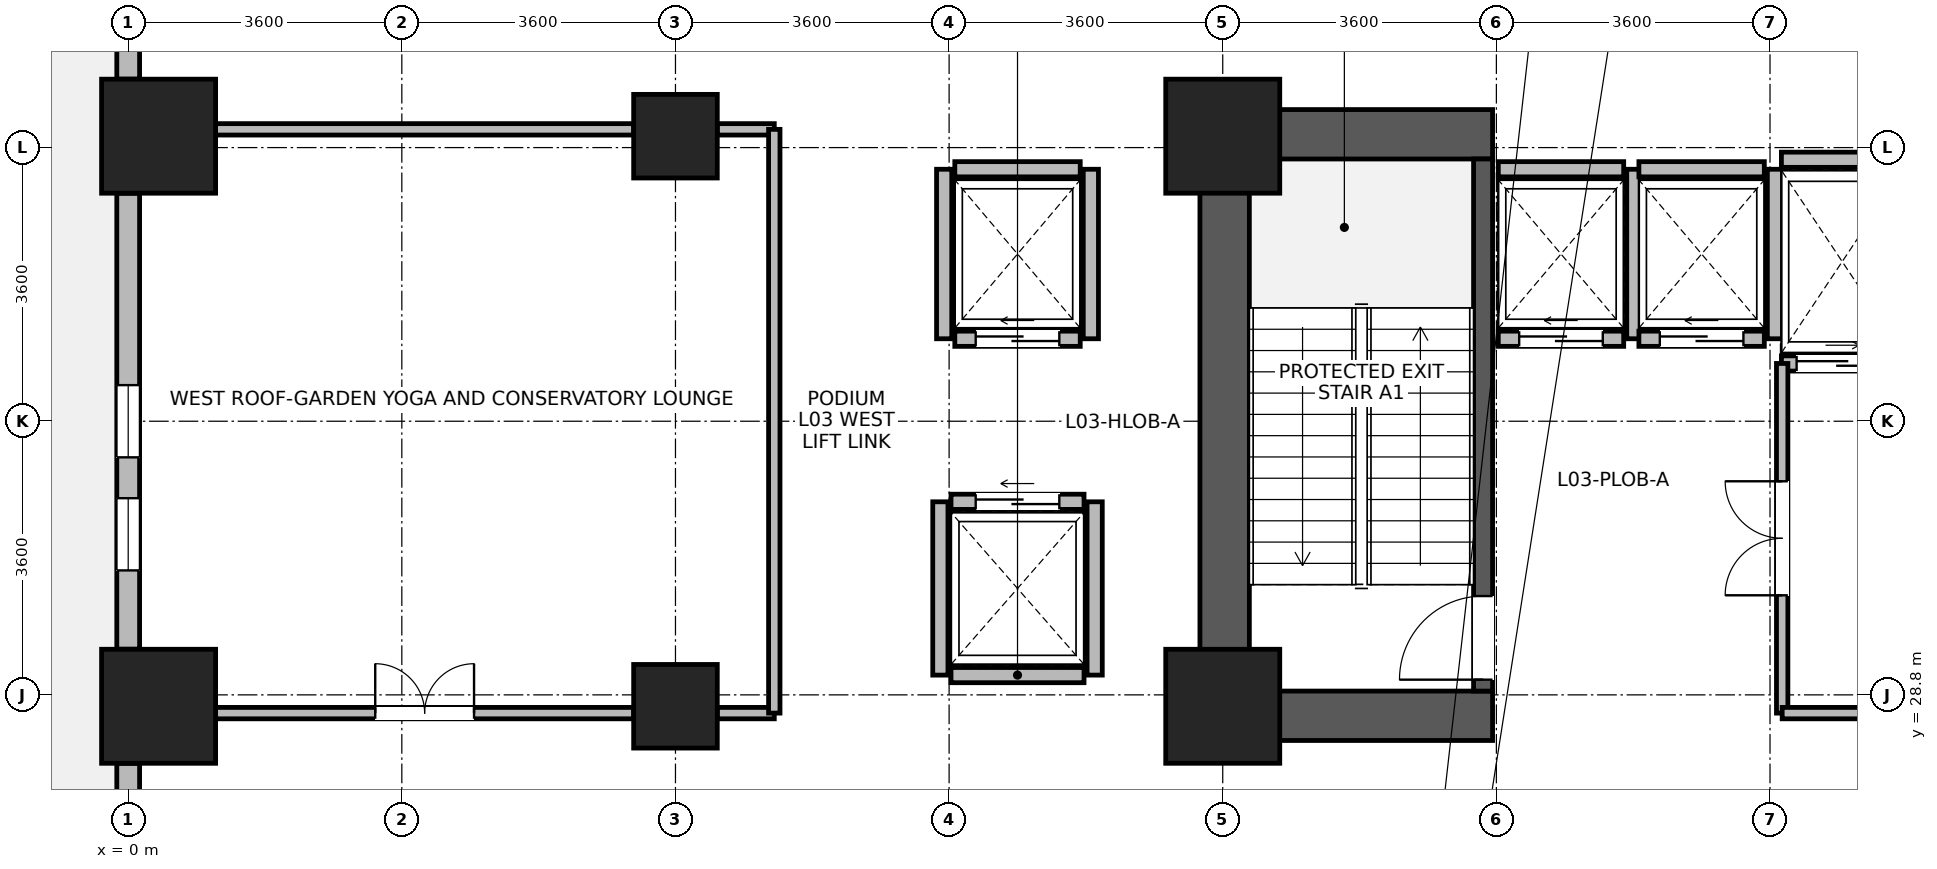
"""IFC4 building model, lengths in metres.
Left out: names, types, materials, properties, quantities, classifications, styles, units other than length and angle.
Written with IfcOpenShell. Run it as: python <this file> out.ifc"""

import sys

from ifc_helpers import new_model, si_unit, direction, frame, frame_2d, origin, origin_2d, place, context, subcontext, project, spatial, rectangle, circle, extrude, source, transform, mapped, element, fill, save


model = new_model("IFC4")
c1 = context("Model", 3, precision=1e-05, world=origin(), true_north=direction((0.0, 1.0)))
c2 = subcontext(c1, "Body", "Model", "MODEL_VIEW")
j1 = project(units=[si_unit("LENGTHUNIT", "METRE"), si_unit("PLANEANGLEUNIT", "RADIAN")], contexts=[c1])
p1 = place(None, origin())
s1 = spatial("IfcSite", under=j1, at=p1, CompositionType="ELEMENT")
p2 = place(p1, origin())
s2 = spatial("IfcBuilding", under=s1, at=p2, CompositionType="ELEMENT")
p3 = place(p2, frame((0.0, 0.0, 15.0)))
s3 = spatial("IfcBuildingStorey", under=s2, at=p3, CompositionType="ELEMENT", Elevation=15.0)
p4 = place(p3, frame((14.425, 28.2, 0.0), z_axis=(0.0, 0.0, 1.0), x_axis=(0.0, 1.0, 0.0)))
e1 = element("IfcWall", 1, at=p4, inside=s3, PredefinedType="SHEAR", context=c2, shape_type="SweptSolid", body=[
    extrude(rectangle(XDim=8.3, YDim=0.65, at=frame_2d((4.15, 0.0))), origin(), (0.0, 0.0, 1.0), 4.38),
])
for number, where, z_axis, x_axis in (
    (2, (14.75, 28.525, 0.0), (0.0, 0.0, 1.0), (1.0, 0.0, 0.0)),
    (3, (14.75, 36.175, 0.0), (0.0, 0.0, 1.0), (1.0, 0.0, 0.0)),
):
    element("IfcWall", number, at=place(p3, frame(where, z_axis=z_axis, x_axis=x_axis)), inside=s3, PredefinedType="SHEAR", context=c2, shape_type="SweptSolid", body=[
        extrude(rectangle(XDim=3.2, YDim=0.65, at=frame_2d((1.6, 0.0))), origin(), (0.0, 0.0, 1.0), 4.38),
    ])
p5 = place(p3, frame((17.825, 28.85, 0.0), z_axis=(0.0, 0.0, 1.0), x_axis=(0.0, 1.0, 0.0)))
e4 = element("IfcWall", 4, at=p5, inside=s3, PredefinedType="SHEAR", context=c2, shape_type="SweptSolid", body=[
    extrude(rectangle(XDim=7.0, YDim=0.25, at=frame_2d((3.5, 0.0))), origin(), (0.0, 0.0, 1.0), 4.38),
])
p6 = place(p5, frame((0.15, 0.0, 0.0)))
e5 = element("IfcOpeningElement", 5, at=p6, cuts=e4, PredefinedType="OPENING", context=c2, shape_type="SweptSolid", body=[
    extrude(rectangle(XDim=1.1, YDim=2.08, at=frame_2d((0.55, 1.04))), frame((0.0, 0.135, 0.0), z_axis=(0.0, -1.0, 0.0), x_axis=(1.0, 0.0, 0.0)), (0.0, 0.0, 1.0), 0.27),
])
m1 = source(origin(), c2, "Body", "SweptSolid", [
    extrude(circle(Radius=0.55, at=origin_2d()), origin(), (0.0, 0.0, 1.0), 4.8),
])
for number, where, z_axis, x_axis in (
    (6, (7.2, 28.65, 0.0), (0.0, 0.0, 1.0), (1.0, 0.0, 0.0)),
    (7, (7.2, 36.15, 0.0), (0.0, 0.0, 1.0), (1.0, 0.0, 0.0)),
):
    element("IfcColumn", number, at=place(p3, frame(where, z_axis=z_axis, x_axis=x_axis)), inside=s3, PredefinedType="COLUMN", context=c2, shape_type="MappedRepresentation", body=[
        mapped(m1, transform((0.0, 0.0, 0.0), x_axis=(1.0, 0.0, 0.0), y_axis=(0.0, 1.0, 0.0), z_axis=(0.0, 0.0, 1.0), scale=1.0)),
    ])
m2 = source(origin(), c2, "Body", "SweptSolid", [
    extrude(rectangle(XDim=1.5, YDim=1.5, at=origin_2d()), origin(), (0.0, 0.0, 1.0), 4.8),
])
for number, where, z_axis, x_axis in (
    (8, (14.4, 28.65, 0.0), (0.0, 0.0, 1.0), (1.0, 0.0, 0.0)),
    (9, (14.4, 36.15, 0.0), (0.0, 0.0, 1.0), (1.0, 0.0, 0.0)),
    (10, (0.4, 28.65, 0.0), (0.0, 0.0, 1.0), (1.0, 0.0, 0.0)),
    (11, (0.4, 36.15, 0.0), (0.0, 0.0, 1.0), (1.0, 0.0, 0.0)),
):
    element("IfcColumn", number, at=place(p3, frame(where, z_axis=z_axis, x_axis=x_axis)), inside=s3, PredefinedType="COLUMN", context=c2, shape_type="MappedRepresentation", body=[
        mapped(m2, transform((0.0, 0.0, 0.0), x_axis=(1.0, 0.0, 0.0), y_axis=(0.0, 1.0, 0.0), z_axis=(0.0, 0.0, 1.0), scale=1.0)),
    ])
p7 = place(p3, frame((0.0, 36.901, 0.0), z_axis=(0.0, 0.0, 1.0), x_axis=(0.0, 1.0, 0.0)))
e12 = element("IfcWall", 12, at=p7, inside=s3, PredefinedType="STANDARD", context=c2, shape_type="SweptSolid", body=[
    extrude(rectangle(XDim=7.198, YDim=0.3, at=frame_2d((3.599, 0.0))), origin(), (0.0, 0.0, 1.0), 4.36),
])
p8 = place(p7, frame((2.699, 0.0, 0.0)))
e13 = element("IfcOpeningElement", 13, at=p8, cuts=e12, PredefinedType="OPENING", context=c2, shape_type="SweptSolid", body=[
    extrude(rectangle(XDim=1.8, YDim=2.2, at=frame_2d((0.9, 1.1))), frame((0.0, 0.16, 0.0), z_axis=(0.0, -1.0, 0.0), x_axis=(1.0, 0.0, 0.0)), (0.0, 0.0, 1.0), 0.32),
])
p9 = place(p3, frame((0.0, 29.401, 0.0), z_axis=(0.0, 0.0, 1.0), x_axis=(0.0, 1.0, 0.0)))
e14 = element("IfcWall", 14, at=p9, inside=s3, PredefinedType="STANDARD", context=c2, shape_type="SweptSolid", body=[
    extrude(rectangle(XDim=5.998, YDim=0.3, at=frame_2d((2.999, 0.0))), origin(), (0.0, 0.0, 1.0), 4.36),
])
p10 = place(p9, frame((2.524, 0.0, 0.9)))
e15 = element("IfcOpeningElement", 15, at=p10, cuts=e14, PredefinedType="OPENING", context=c2, shape_type="SweptSolid", body=[
    extrude(rectangle(XDim=0.95, YDim=1.75, at=frame_2d((0.475, 0.875))), frame((0.0, 0.16, 0.0), z_axis=(0.0, -1.0, 0.0), x_axis=(1.0, 0.0, 0.0)), (0.0, 0.0, 1.0), 0.32),
])
p11 = place(p9, frame((1.037, 0.0, 0.9)))
e16 = element("IfcOpeningElement", 16, at=p11, cuts=e14, PredefinedType="OPENING", context=c2, shape_type="SweptSolid", body=[
    extrude(rectangle(XDim=0.95, YDim=1.75, at=frame_2d((0.475, 0.875))), frame((0.0, 0.16, 0.0), z_axis=(0.0, -1.0, 0.0), x_axis=(1.0, 0.0, 0.0)), (0.0, 0.0, 1.0), 0.32),
])
p12 = place(p3, frame((0.0, 18.751, 0.0), z_axis=(0.0, 0.0, 1.0), x_axis=(0.0, 1.0, 0.0)))
e17 = element("IfcWall", 17, at=p12, inside=s3, PredefinedType="STANDARD", context=c2, shape_type="SweptSolid", body=[
    extrude(rectangle(XDim=9.148, YDim=0.3, at=frame_2d((4.574, 0.0))), origin(), (0.0, 0.0, 1.0), 4.36),
])
p13 = place(p12, frame((0.325, 0.0, 0.9)))
e18 = element("IfcOpeningElement", 18, at=p13, cuts=e17, PredefinedType="OPENING", context=c2, shape_type="SweptSolid", body=[
    extrude(rectangle(XDim=2.4, YDim=2.5, at=frame_2d((1.2, 1.25))), frame((0.0, 0.16, 0.0), z_axis=(0.0, -1.0, 0.0), x_axis=(1.0, 0.0, 0.0)), (0.0, 0.0, 1.0), 0.32),
])
p14 = place(p12, frame((3.374, 0.0, 0.9)))
e19 = element("IfcOpeningElement", 19, at=p14, cuts=e17, PredefinedType="OPENING", context=c2, shape_type="SweptSolid", body=[
    extrude(rectangle(XDim=2.4, YDim=2.5, at=frame_2d((1.2, 1.25))), frame((0.0, 0.16, 0.0), z_axis=(0.0, -1.0, 0.0), x_axis=(1.0, 0.0, 0.0)), (0.0, 0.0, 1.0), 0.32),
])
p15 = place(p3, frame((18.025, 33.485, 0.0), z_axis=(0.0, 0.0, 1.0), x_axis=(1.0, 0.0, 0.0)))
e20 = element("IfcWall", 20, at=p15, inside=s3, PredefinedType="PARTITIONING", context=c2, shape_type="SweptSolid", body=[
    extrude(rectangle(XDim=1.65, YDim=0.2, at=frame_2d((0.825, 0.0))), origin(), (0.0, 0.0, 1.0), 4.36),
])
p16 = place(p15, frame((0.275, 0.0, 0.0)))
e21 = element("IfcOpeningElement", 21, at=p16, cuts=e20, PredefinedType="OPENING", context=c2, shape_type="SweptSolid", body=[
    extrude(rectangle(XDim=1.1, YDim=2.12, at=frame_2d((0.55, 1.06))), frame((0.0, 0.11, 0.0), z_axis=(0.0, -1.0, 0.0), x_axis=(1.0, 0.0, 0.0)), (0.0, 0.0, 1.0), 0.22),
])
p17 = place(p3, frame((18.025, 35.715, 0.0), z_axis=(0.0, 0.0, 1.0), x_axis=(1.0, 0.0, 0.0)))
e22 = element("IfcWall", 22, at=p17, inside=s3, PredefinedType="PARTITIONING", context=c2, shape_type="SweptSolid", body=[
    extrude(rectangle(XDim=1.65, YDim=0.2, at=frame_2d((0.825, 0.0))), origin(), (0.0, 0.0, 1.0), 4.36),
])
p18 = place(p3, frame((19.815, 33.485, 0.0), z_axis=(0.0, 0.0, 1.0), x_axis=(0.0, 1.0, 0.0)))
e23 = element("IfcWall", 23, at=p18, inside=s3, PredefinedType="PARTITIONING", context=c2, shape_type="SweptSolid", body=[
    extrude(rectangle(XDim=2.23, YDim=0.2, at=frame_2d((1.115, 0.0))), origin(), (0.0, 0.0, 1.0), 4.36),
])
p19 = place(p3, frame((19.875, 33.485, 0.0), z_axis=(0.0, 0.0, 1.0), x_axis=(1.0, 0.0, 0.0)))
e24 = element("IfcWall", 24, at=p19, inside=s3, PredefinedType="PARTITIONING", context=c2, shape_type="SweptSolid", body=[
    extrude(rectangle(XDim=1.65, YDim=0.2, at=frame_2d((0.825, 0.0))), origin(), (0.0, 0.0, 1.0), 4.36),
])
p20 = place(p19, frame((0.275, 0.0, 0.0)))
e25 = element("IfcOpeningElement", 25, at=p20, cuts=e24, PredefinedType="OPENING", context=c2, shape_type="SweptSolid", body=[
    extrude(rectangle(XDim=1.1, YDim=2.12, at=frame_2d((0.55, 1.06))), frame((0.0, 0.11, 0.0), z_axis=(0.0, -1.0, 0.0), x_axis=(1.0, 0.0, 0.0)), (0.0, 0.0, 1.0), 0.22),
])
p21 = place(p3, frame((19.875, 35.715, 0.0), z_axis=(0.0, 0.0, 1.0), x_axis=(1.0, 0.0, 0.0)))
e26 = element("IfcWall", 26, at=p21, inside=s3, PredefinedType="PARTITIONING", context=c2, shape_type="SweptSolid", body=[
    extrude(rectangle(XDim=1.65, YDim=0.2, at=frame_2d((0.825, 0.0))), origin(), (0.0, 0.0, 1.0), 4.36),
])
p22 = place(p3, frame((21.665, 33.485, 0.0), z_axis=(0.0, 0.0, 1.0), x_axis=(0.0, 1.0, 0.0)))
e27 = element("IfcWall", 27, at=p22, inside=s3, PredefinedType="PARTITIONING", context=c2, shape_type="SweptSolid", body=[
    extrude(rectangle(XDim=2.23, YDim=0.2, at=frame_2d((1.115, 0.0))), origin(), (0.0, 0.0, 1.0), 4.36),
])
p23 = place(p3, frame((10.825, 29.06, 0.0), z_axis=(0.0, 0.0, 1.0), x_axis=(1.0, 0.0, 0.0)))
e28 = element("IfcWall", 28, at=p23, inside=s3, PredefinedType="PARTITIONING", context=c2, shape_type="SweptSolid", body=[
    extrude(rectangle(XDim=1.75, YDim=0.2, at=frame_2d((0.875, 0.0))), origin(), (0.0, 0.0, 1.0), 4.36),
])
p24 = place(p3, frame((10.825, 31.34, 0.0), z_axis=(0.0, 0.0, 1.0), x_axis=(1.0, 0.0, 0.0)))
e29 = element("IfcWall", 29, at=p24, inside=s3, PredefinedType="PARTITIONING", context=c2, shape_type="SweptSolid", body=[
    extrude(rectangle(XDim=1.75, YDim=0.2, at=frame_2d((0.875, 0.0))), origin(), (0.0, 0.0, 1.0), 4.36),
])
p25 = place(p24, frame((0.325, 0.0, 0.0)))
e30 = element("IfcOpeningElement", 30, at=p25, cuts=e29, PredefinedType="OPENING", context=c2, shape_type="SweptSolid", body=[
    extrude(rectangle(XDim=1.1, YDim=2.12, at=frame_2d((0.55, 1.06))), frame((0.0, 0.11, 0.0), z_axis=(0.0, -1.0, 0.0), x_axis=(1.0, 0.0, 0.0)), (0.0, 0.0, 1.0), 0.22),
])
for number, where, z_axis, x_axis in (
    (31, (10.685, 29.06, 0.0), (0.0, 0.0, 1.0), (0.0, 1.0, 0.0)),
    (32, (12.715, 29.06, 0.0), (0.0, 0.0, 1.0), (0.0, 1.0, 0.0)),
):
    element("IfcWall", number, at=place(p3, frame(where, z_axis=z_axis, x_axis=x_axis)), inside=s3, PredefinedType="PARTITIONING", context=c2, shape_type="SweptSolid", body=[
        extrude(rectangle(XDim=2.28, YDim=0.2, at=frame_2d((1.14, 0.0))), origin(), (0.0, 0.0, 1.0), 4.36),
    ])
p26 = place(p3, frame((10.875, 33.485, 0.0), z_axis=(0.0, 0.0, 1.0), x_axis=(1.0, 0.0, 0.0)))
e33 = element("IfcWall", 33, at=p26, inside=s3, PredefinedType="PARTITIONING", context=c2, shape_type="SweptSolid", body=[
    extrude(rectangle(XDim=1.65, YDim=0.2, at=frame_2d((0.825, 0.0))), origin(), (0.0, 0.0, 1.0), 4.36),
])
p27 = place(p26, frame((0.275, 0.0, 0.0)))
e34 = element("IfcOpeningElement", 34, at=p27, cuts=e33, PredefinedType="OPENING", context=c2, shape_type="SweptSolid", body=[
    extrude(rectangle(XDim=1.1, YDim=2.12, at=frame_2d((0.55, 1.06))), frame((0.0, 0.11, 0.0), z_axis=(0.0, -1.0, 0.0), x_axis=(1.0, 0.0, 0.0)), (0.0, 0.0, 1.0), 0.22),
])
p28 = place(p3, frame((10.875, 35.715, 0.0), z_axis=(0.0, 0.0, 1.0), x_axis=(1.0, 0.0, 0.0)))
e35 = element("IfcWall", 35, at=p28, inside=s3, PredefinedType="PARTITIONING", context=c2, shape_type="SweptSolid", body=[
    extrude(rectangle(XDim=1.65, YDim=0.2, at=frame_2d((0.825, 0.0))), origin(), (0.0, 0.0, 1.0), 4.36),
])
for number, where, z_axis, x_axis in (
    (36, (10.735, 33.485, 0.0), (0.0, 0.0, 1.0), (0.0, 1.0, 0.0)),
    (37, (12.665, 33.485, 0.0), (0.0, 0.0, 1.0), (0.0, 1.0, 0.0)),
):
    element("IfcWall", number, at=place(p3, frame(where, z_axis=z_axis, x_axis=x_axis)), inside=s3, PredefinedType="PARTITIONING", context=c2, shape_type="SweptSolid", body=[
        extrude(rectangle(XDim=2.23, YDim=0.2, at=frame_2d((1.115, 0.0))), origin(), (0.0, 0.0, 1.0), 4.36),
    ])
p29 = place(p3, frame((21.75, 33.16, 0.0), z_axis=(0.0, 0.0, 1.0), x_axis=(1.0, 0.0, 0.0)))
e38 = element("IfcWall", 38, at=p29, inside=s3, PredefinedType="PARTITIONING", context=c2, shape_type="SweptSolid", body=[
    extrude(rectangle(XDim=1.6, YDim=0.2, at=frame_2d((0.8, 0.0))), origin(), (0.0, 0.0, 1.0), 4.36),
])
p30 = place(p29, frame((0.2, 0.0, 0.0)))
e39 = element("IfcOpeningElement", 39, at=p30, cuts=e38, PredefinedType="OPENING", context=c2, shape_type="SweptSolid", body=[
    extrude(rectangle(XDim=1.2, YDim=2.12, at=frame_2d((0.6, 1.06))), frame((0.0, 0.11, 0.0), z_axis=(0.0, -1.0, 0.0), x_axis=(1.0, 0.0, 0.0)), (0.0, 0.0, 1.0), 0.22),
])
p31 = place(p3, frame((21.75, 35.84, 0.0), z_axis=(0.0, 0.0, 1.0), x_axis=(1.0, 0.0, 0.0)))
e40 = element("IfcWall", 40, at=p31, inside=s3, PredefinedType="PARTITIONING", context=c2, shape_type="SweptSolid", body=[
    extrude(rectangle(XDim=1.6, YDim=0.2, at=frame_2d((0.8, 0.0))), origin(), (0.0, 0.0, 1.0), 3.16),
])
p32 = place(p3, frame((1.15, 28.56, 0.0), z_axis=(0.0, 0.0, 1.0), x_axis=(1.0, 0.0, 0.0)))
e41 = element("IfcWall", 41, at=p32, inside=s3, PredefinedType="PARTITIONING", context=c2, shape_type="SweptSolid", body=[
    extrude(rectangle(XDim=5.5, YDim=0.15, at=frame_2d((2.75, 0.0))), origin(), (0.0, 0.0, 1.0), 3.66),
])
p33 = place(p32, frame((2.1, 0.0, 0.0)))
e42 = element("IfcOpeningElement", 42, at=p33, cuts=e41, PredefinedType="OPENING", context=c2, shape_type="SweptSolid", body=[
    extrude(rectangle(XDim=1.3, YDim=2.12, at=frame_2d((0.65, 1.06))), frame((0.0, 0.085, 0.0), z_axis=(0.0, -1.0, 0.0), x_axis=(1.0, 0.0, 0.0)), (0.0, 0.0, 1.0), 0.17),
])
p34 = place(p3, frame((7.75, 28.56, 0.0), z_axis=(0.0, 0.0, 1.0), x_axis=(1.0, 0.0, 0.0)))
e43 = element("IfcWall", 43, at=p34, inside=s3, PredefinedType="PARTITIONING", context=c2, shape_type="SweptSolid", body=[
    extrude(rectangle(XDim=0.75, YDim=0.15, at=frame_2d((0.375, 0.0))), origin(), (0.0, 0.0, 1.0), 3.66),
])
p35 = place(p3, frame((1.15, 36.24, 0.0), z_axis=(0.0, 0.0, 1.0), x_axis=(1.0, 0.0, 0.0)))
e44 = element("IfcWall", 44, at=p35, inside=s3, PredefinedType="PARTITIONING", context=c2, shape_type="SweptSolid", body=[
    extrude(rectangle(XDim=5.5, YDim=0.15, at=frame_2d((2.75, 0.0))), origin(), (0.0, 0.0, 1.0), 3.66),
])
p36 = place(p3, frame((7.75, 36.24, 0.0), z_axis=(0.0, 0.0, 1.0), x_axis=(1.0, 0.0, 0.0)))
e45 = element("IfcWall", 45, at=p36, inside=s3, PredefinedType="PARTITIONING", context=c2, shape_type="SweptSolid", body=[
    extrude(rectangle(XDim=0.75, YDim=0.15, at=frame_2d((0.375, 0.0))), origin(), (0.0, 0.0, 1.0), 3.66),
])
p37 = place(p3, frame((8.5, 28.56, 0.0), z_axis=(0.0, 0.0, 1.0), x_axis=(0.0, 1.0, 0.0)))
e46 = element("IfcWall", 46, at=p37, inside=s3, PredefinedType="PARTITIONING", context=c2, shape_type="SweptSolid", body=[
    extrude(rectangle(XDim=7.68, YDim=0.15, at=frame_2d((3.84, 0.0))), origin(), (0.0, 0.0, 1.0), 4.36),
])
p38 = place(p3, frame((21.76, 28.56, 0.0), z_axis=(0.0, 0.0, 1.0), x_axis=(0.0, 1.0, 0.0)))
e47 = element("IfcWall", 47, at=p38, inside=s3, PredefinedType="PARTITIONING", context=c2, shape_type="SweptSolid", body=[
    extrude(rectangle(XDim=4.6, YDim=0.15, at=frame_2d((2.3, 0.0))), origin(), (0.0, 0.0, 1.0), 4.36),
])
p39 = place(p38, frame((1.55, 0.0, 0.0)))
e48 = element("IfcOpeningElement", 48, at=p39, cuts=e47, PredefinedType="OPENING", context=c2, shape_type="SweptSolid", body=[
    extrude(rectangle(XDim=1.5, YDim=2.1, at=frame_2d((0.75, 1.05))), frame((0.0, 0.085, 0.0), z_axis=(0.0, -1.0, 0.0), x_axis=(1.0, 0.0, 0.0)), (0.0, 0.0, 1.0), 0.17),
])
p40 = place(p3, frame((21.76, 28.56, 0.0), z_axis=(0.0, 0.0, 1.0), x_axis=(1.0, 0.0, 0.0)))
e49 = element("IfcWall", 49, at=p40, inside=s3, PredefinedType="PARTITIONING", context=c2, shape_type="SweptSolid", body=[
    extrude(rectangle(XDim=3.48, YDim=0.15, at=frame_2d((1.74, 0.0))), origin(), (0.0, 0.0, 1.0), 3.16),
])
p41 = place(p10, origin())
e50 = element("IfcWindow", 50, at=p41, inside=s3, PartitioningType="SINGLE_PANEL", PredefinedType="WINDOW", context=c2, shape_type="SweptSolid", body=[
    extrude(rectangle(XDim=0.95, YDim=1.75, at=frame_2d((0.475, 0.875))), frame((0.0, 0.03, 0.0), z_axis=(0.0, -1.0, 0.0), x_axis=(1.0, 0.0, 0.0)), (0.0, 0.0, 1.0), 0.06),
])
fill(e15, e50)
p42 = place(p11, origin())
e51 = element("IfcWindow", 51, at=p42, inside=s3, PartitioningType="SINGLE_PANEL", PredefinedType="WINDOW", context=c2, shape_type="SweptSolid", body=[
    extrude(rectangle(XDim=0.95, YDim=1.75, at=frame_2d((0.475, 0.875))), frame((0.0, 0.03, 0.0), z_axis=(0.0, -1.0, 0.0), x_axis=(1.0, 0.0, 0.0)), (0.0, 0.0, 1.0), 0.06),
])
fill(e16, e51)
p43 = place(p6, origin())
e52 = element("IfcDoor", 52, at=p43, inside=s3, OperationType="SINGLE_SWING_LEFT", PredefinedType="DOOR", context=c2, shape_type="SweptSolid", body=[
    extrude(rectangle(XDim=1.1, YDim=2.08, at=frame_2d((0.55, 1.04))), frame((0.0, 0.025, 0.0), z_axis=(0.0, -1.0, 0.0), x_axis=(1.0, 0.0, 0.0)), (0.0, 0.0, 1.0), 0.05),
])
fill(e5, e52)
p44 = place(p16, origin())
e53 = element("IfcDoor", 53, at=p44, inside=s3, OperationType="SLIDING_TO_LEFT", PredefinedType="DOOR", context=c2, shape_type="SweptSolid", body=[
    extrude(rectangle(XDim=1.1, YDim=2.12, at=frame_2d((0.55, 1.06))), frame((0.0, 0.025, 0.0), z_axis=(0.0, -1.0, 0.0), x_axis=(1.0, 0.0, 0.0)), (0.0, 0.0, 1.0), 0.05),
])
fill(e21, e53)
p45 = place(p20, origin())
e54 = element("IfcDoor", 54, at=p45, inside=s3, OperationType="SLIDING_TO_LEFT", PredefinedType="DOOR", context=c2, shape_type="SweptSolid", body=[
    extrude(rectangle(XDim=1.1, YDim=2.12, at=frame_2d((0.55, 1.06))), frame((0.0, 0.025, 0.0), z_axis=(0.0, -1.0, 0.0), x_axis=(1.0, 0.0, 0.0)), (0.0, 0.0, 1.0), 0.05),
])
fill(e25, e54)
p46 = place(p25, origin())
e55 = element("IfcDoor", 55, at=p46, inside=s3, OperationType="SLIDING_TO_LEFT", PredefinedType="DOOR", context=c2, shape_type="SweptSolid", body=[
    extrude(rectangle(XDim=1.1, YDim=2.12, at=frame_2d((0.55, 1.06))), frame((0.0, 0.025, 0.0), z_axis=(0.0, -1.0, 0.0), x_axis=(1.0, 0.0, 0.0)), (0.0, 0.0, 1.0), 0.05),
])
fill(e30, e55)
p47 = place(p27, origin())
e56 = element("IfcDoor", 56, at=p47, inside=s3, OperationType="SLIDING_TO_LEFT", PredefinedType="DOOR", context=c2, shape_type="SweptSolid", body=[
    extrude(rectangle(XDim=1.1, YDim=2.12, at=frame_2d((0.55, 1.06))), frame((0.0, 0.025, 0.0), z_axis=(0.0, -1.0, 0.0), x_axis=(1.0, 0.0, 0.0)), (0.0, 0.0, 1.0), 0.05),
])
fill(e34, e56)
p48 = place(p30, origin())
e57 = element("IfcDoor", 57, at=p48, inside=s3, OperationType="SLIDING_TO_RIGHT", PredefinedType="DOOR", context=c2, shape_type="SweptSolid", body=[
    extrude(rectangle(XDim=1.2, YDim=2.12, at=frame_2d((0.6, 1.06))), frame((0.0, 0.025, 0.0), z_axis=(0.0, -1.0, 0.0), x_axis=(1.0, 0.0, 0.0)), (0.0, 0.0, 1.0), 0.05),
])
fill(e39, e57)
p49 = place(p33, origin())
e58 = element("IfcDoor", 58, at=p49, inside=s3, OperationType="DOUBLE_DOOR_SINGLE_SWING", PredefinedType="DOOR", context=c2, shape_type="SweptSolid", body=[
    extrude(rectangle(XDim=1.3, YDim=2.12, at=frame_2d((0.65, 1.06))), frame((0.0, 0.025, 0.0), z_axis=(0.0, -1.0, 0.0), x_axis=(1.0, 0.0, 0.0)), (0.0, 0.0, 1.0), 0.05),
])
fill(e42, e58)
p50 = place(p39, origin())
e59 = element("IfcDoor", 59, at=p50, inside=s3, OperationType="DOUBLE_DOOR_SINGLE_SWING", PredefinedType="DOOR", context=c2, shape_type="SweptSolid", body=[
    extrude(rectangle(XDim=1.5, YDim=2.1, at=frame_2d((0.75, 1.05))), frame((0.0, 0.025, 0.0), z_axis=(0.0, -1.0, 0.0), x_axis=(1.0, 0.0, 0.0)), (0.0, 0.0, 1.0), 0.05),
])
fill(e48, e59)
save(model, sys.argv[1])
